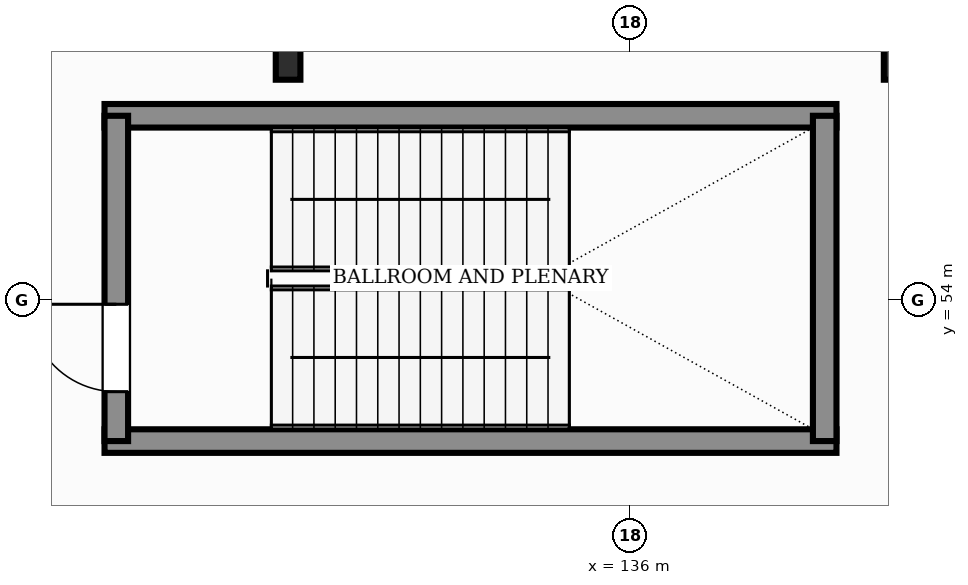
"""IFC4 building model, lengths in metres.
Left out: names, types, materials, properties, quantities, classifications, styles, units other than length and angle.
Written with IfcOpenShell. Run it as: python <this file> out.ifc"""

import sys

from ifc_helpers import new_model, si_unit, direction, frame, frame_2d, origin, origin_2d, place, context, subcontext, project, spatial, rectangle, i_section, extrude, element, fill, save


model = new_model("IFC4")
c1 = context("Model", 3, precision=1e-05, world=origin(), true_north=direction((0.0, 1.0)))
c2 = subcontext(c1, "Body", "Model", "MODEL_VIEW")
j1 = project(units=[si_unit("LENGTHUNIT", "METRE"), si_unit("PLANEANGLEUNIT", "RADIAN")], contexts=[c1])
p1 = place(None, origin())
s1 = spatial("IfcSite", under=j1, at=p1, CompositionType="ELEMENT")
p2 = place(p1, origin())
s2 = spatial("IfcBuilding", under=s1, at=p2, CompositionType="ELEMENT")
p3 = place(p2, frame((0.0, 0.0, 6.0)))
s3 = spatial("IfcBuildingStorey", under=s2, at=p3, CompositionType="ELEMENT", Elevation=6.0)
for number, where, z_axis, x_axis in (
    (1, (131.5, 57.2, 0.0), (0.0, 0.0, 1.0), (1.0, 0.0, 0.0)),
    (2, (139.5, 57.2, 0.0), (0.0, 0.0, 1.0), (1.0, 0.0, 0.0)),
):
    element("IfcColumn", number, at=place(p3, frame(where, z_axis=z_axis, x_axis=x_axis)), inside=s3, PredefinedType="COLUMN", context=c2, shape_type="SweptSolid", body=[
        extrude(i_section(OverallWidth=0.324, OverallDepth=0.611, WebThickness=0.013, FlangeThickness=0.019, FilletRadius=0.013, at=origin_2d()), origin(), (0.0, 0.0, 1.0), 5.4),
    ])
for number, where, z_axis, x_axis in (
    (3, (129.085, 52.14, 0.0), (0.0, 0.0, 1.0), (1.0, 0.0, 0.0)),
    (4, (129.085, 56.42, 0.0), (0.0, 0.0, 1.0), (1.0, 0.0, 0.0)),
):
    element("IfcWall", number, at=place(p3, frame(where, z_axis=z_axis, x_axis=x_axis)), inside=s3, PredefinedType="SHEAR", context=c2, shape_type="SweptSolid", body=[
        extrude(rectangle(XDim=9.63, YDim=0.31, at=frame_2d((4.815, 0.0))), origin(), (0.0, 0.0, 1.0), 5.4),
    ])
p4 = place(p3, frame((129.24, 52.14, 0.0), z_axis=(0.0, 0.0, 1.0), x_axis=(0.0, 1.0, 0.0)))
e5 = element("IfcWall", 5, at=p4, inside=s3, PredefinedType="SHEAR", context=c2, shape_type="SweptSolid", body=[
    extrude(rectangle(XDim=4.28, YDim=0.31, at=frame_2d((2.14, 0.0))), origin(), (0.0, 0.0, 1.0), 5.4),
])
p5 = place(p4, frame((0.65, 0.0, 0.0)))
e6 = element("IfcOpeningElement", 6, at=p5, cuts=e5, PredefinedType="OPENING", context=c2, shape_type="SweptSolid", body=[
    extrude(rectangle(XDim=1.15, YDim=2.2, at=frame_2d((0.575, 1.1))), frame((0.0, 0.165, 0.0), z_axis=(0.0, -1.0, 0.0), x_axis=(1.0, 0.0, 0.0)), (0.0, 0.0, 1.0), 0.33),
])
p6 = place(p3, frame((138.56, 52.14, 0.0), z_axis=(0.0, 0.0, 1.0), x_axis=(0.0, 1.0, 0.0)))
e7 = element("IfcWall", 7, at=p6, inside=s3, PredefinedType="SHEAR", context=c2, shape_type="SweptSolid", body=[
    extrude(rectangle(XDim=4.28, YDim=0.31, at=frame_2d((2.14, 0.0))), origin(), (0.0, 0.0, 1.0), 5.4),
])
p7 = place(p5, origin())
e8 = element("IfcDoor", 8, at=p7, inside=s3, OperationType="SINGLE_SWING_RIGHT", PredefinedType="DOOR", context=c2, shape_type="SweptSolid", body=[
    extrude(rectangle(XDim=1.15, YDim=2.2, at=frame_2d((0.575, 1.1))), frame((0.0, 0.025, 0.0), z_axis=(0.0, -1.0, 0.0), x_axis=(1.0, 0.0, 0.0)), (0.0, 0.0, 1.0), 0.05),
])
fill(e6, e8)
save(model, sys.argv[1])
